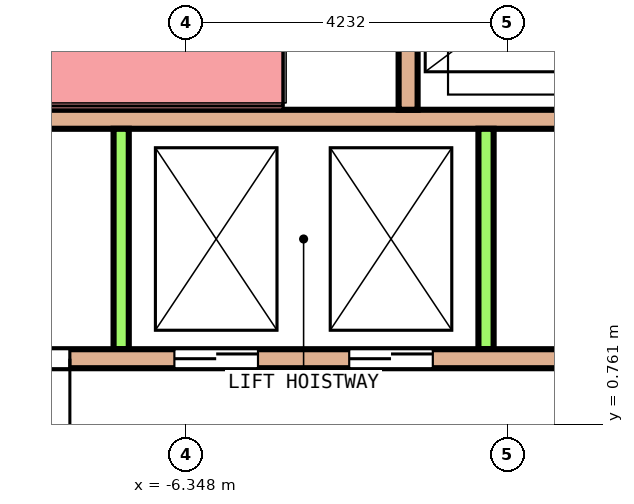
"""IFC4 building model, lengths in metres.
Left out: names, types, materials, properties, quantities, classifications, styles, units other than length and angle.
Written with IfcOpenShell. Run it as: python <this file> out.ifc"""

import sys

from ifc_helpers import new_model, si_unit, direction, frame, frame_2d, origin, place, context, subcontext, project, spatial, rectangle, extrude, element, fill, save


model = new_model("IFC4")
c1 = context("Model", 3, precision=1e-05, world=origin(), true_north=direction((0.0, 1.0)))
c2 = subcontext(c1, "Body", "Model", "MODEL_VIEW")
j1 = project(units=[si_unit("LENGTHUNIT", "METRE"), si_unit("PLANEANGLEUNIT", "RADIAN")], contexts=[c1])
p1 = place(None, origin())
s1 = spatial("IfcSite", under=j1, at=p1, CompositionType="ELEMENT")
p2 = place(p1, origin())
s2 = spatial("IfcBuilding", under=s1, at=p2, CompositionType="ELEMENT")
p3 = place(p2, frame((0.0, 0.0, 158.4)))
s3 = spatial("IfcBuildingStorey", under=s2, at=p3, CompositionType="ELEMENT", Elevation=158.4)
p4 = place(p3, frame((-9.35, 1.625, 0.0), z_axis=(0.0, 0.0, 1.0), x_axis=(1.0, 0.0, 0.0)))
e1 = element("IfcWall", 1, at=p4, inside=s3, PredefinedType="SOLIDWALL", context=c2, shape_type="SweptSolid", body=[
    extrude(rectangle(XDim=18.7, YDim=0.25, at=frame_2d((9.35, 0.0))), origin(), (0.0, 0.0, 1.0), 4.1),
])
p5 = place(p4, frame((2.85, 0.0, 0.0)))
e2 = element("IfcOpeningElement", 2, at=p5, cuts=e1, PredefinedType="OPENING", context=c2, shape_type="SweptSolid", body=[
    extrude(rectangle(XDim=1.1, YDim=2.1, at=frame_2d((0.55, 1.05))), frame((0.0, 0.135, 0.0), z_axis=(0.0, -1.0, 0.0), x_axis=(1.0, 0.0, 0.0)), (0.0, 0.0, 1.0), 0.27),
])
p6 = place(p4, frame((5.15, 0.0, 0.0)))
e3 = element("IfcOpeningElement", 3, at=p6, cuts=e1, PredefinedType="OPENING", context=c2, shape_type="SweptSolid", body=[
    extrude(rectangle(XDim=1.1, YDim=2.1, at=frame_2d((0.55, 1.05))), frame((0.0, 0.135, 0.0), z_axis=(0.0, -1.0, 0.0), x_axis=(1.0, 0.0, 0.0)), (0.0, 0.0, 1.0), 0.27),
])
p7 = place(p4, frame((14.8, 0.0, 0.0)))
e4 = element("IfcOpeningElement", 4, at=p7, cuts=e1, PredefinedType="OPENING", context=c2, shape_type="SweptSolid", body=[
    extrude(rectangle(XDim=1.1, YDim=2.1, at=frame_2d((0.55, 1.05))), frame((0.0, 0.135, 0.0), z_axis=(0.0, -1.0, 0.0), x_axis=(1.0, 0.0, 0.0)), (0.0, 0.0, 1.0), 0.27),
])
p8 = place(p4, frame((0.575, 0.0, 0.0)))
e5 = element("IfcOpeningElement", 5, at=p8, cuts=e1, PredefinedType="OPENING", context=c2, shape_type="SweptSolid", body=[
    extrude(rectangle(XDim=0.9, YDim=2.1, at=frame_2d((0.45, 1.05))), frame((0.0, 0.135, 0.0), z_axis=(0.0, -1.0, 0.0), x_axis=(1.0, 0.0, 0.0)), (0.0, 0.0, 1.0), 0.27),
])
p9 = place(p4, frame((17.225, 0.0, 0.0)))
e6 = element("IfcOpeningElement", 6, at=p9, cuts=e1, PredefinedType="OPENING", context=c2, shape_type="SweptSolid", body=[
    extrude(rectangle(XDim=0.9, YDim=2.1, at=frame_2d((0.45, 1.05))), frame((0.0, 0.135, 0.0), z_axis=(0.0, -1.0, 0.0), x_axis=(1.0, 0.0, 0.0)), (0.0, 0.0, 1.0), 0.27),
])
p10 = place(p3, frame((-9.35, 4.775, 0.0), z_axis=(0.0, 0.0, 1.0), x_axis=(1.0, 0.0, 0.0)))
e7 = element("IfcWall", 7, at=p10, inside=s3, PredefinedType="SOLIDWALL", context=c2, shape_type="SweptSolid", body=[
    extrude(rectangle(XDim=18.7, YDim=0.25, at=frame_2d((9.35, 0.0))), origin(), (0.0, 0.0, 1.0), 4.1),
])
for number, where, z_axis, x_axis in (
    (8, (-7.2, 1.75, 0.0), (0.0, 0.0, 1.0), (0.0, 1.0, 0.0)),
    (9, (-2.4, 1.75, 0.0), (0.0, 0.0, 1.0), (0.0, 1.0, 0.0)),
):
    element("IfcWall", number, at=place(p3, frame(where, z_axis=z_axis, x_axis=x_axis)), inside=s3, PredefinedType="SOLIDWALL", context=c2, shape_type="SweptSolid", body=[
        extrude(rectangle(XDim=2.9, YDim=0.2, at=frame_2d((1.45, 0.0))), origin(), (0.0, 0.0, 1.0), 4.1),
    ])
p11 = place(p3, frame((-3.425, 4.9, 0.0), z_axis=(0.0, 0.0, 1.0), x_axis=(0.0, 1.0, 0.0)))
e10 = element("IfcWall", 10, at=p11, inside=s3, PredefinedType="SOLIDWALL", context=c2, shape_type="SweptSolid", body=[
    extrude(rectangle(XDim=2.85, YDim=0.25, at=frame_2d((1.425, 0.0))), origin(), (0.0, 0.0, 1.0), 4.1),
])
p12 = place(p5, origin())
e11 = element("IfcDoor", 11, at=p12, inside=s3, OperationType="DOUBLE_DOOR_SLIDING", PredefinedType="DOOR", context=c2, shape_type="SweptSolid", body=[
    extrude(rectangle(XDim=1.1, YDim=2.1, at=frame_2d((0.55, 1.05))), frame((0.0, 0.075, 0.0), z_axis=(0.0, -1.0, 0.0), x_axis=(1.0, 0.0, 0.0)), (0.0, 0.0, 1.0), 0.15),
])
fill(e2, e11)
p13 = place(p6, origin())
e12 = element("IfcDoor", 12, at=p13, inside=s3, OperationType="DOUBLE_DOOR_SLIDING", PredefinedType="DOOR", context=c2, shape_type="SweptSolid", body=[
    extrude(rectangle(XDim=1.1, YDim=2.1, at=frame_2d((0.55, 1.05))), frame((0.0, 0.075, 0.0), z_axis=(0.0, -1.0, 0.0), x_axis=(1.0, 0.0, 0.0)), (0.0, 0.0, 1.0), 0.15),
])
fill(e3, e12)
p14 = place(p8, origin())
e13 = element("IfcDoor", 13, at=p14, inside=s3, OperationType="SINGLE_SWING_LEFT", PredefinedType="DOOR", context=c2, shape_type="SweptSolid", body=[
    extrude(rectangle(XDim=0.9, YDim=2.1, at=frame_2d((0.45, 1.05))), frame((0.0, 0.075, 0.0), z_axis=(0.0, -1.0, 0.0), x_axis=(1.0, 0.0, 0.0)), (0.0, 0.0, 1.0), 0.15),
])
fill(e5, e13)
save(model, sys.argv[1])
